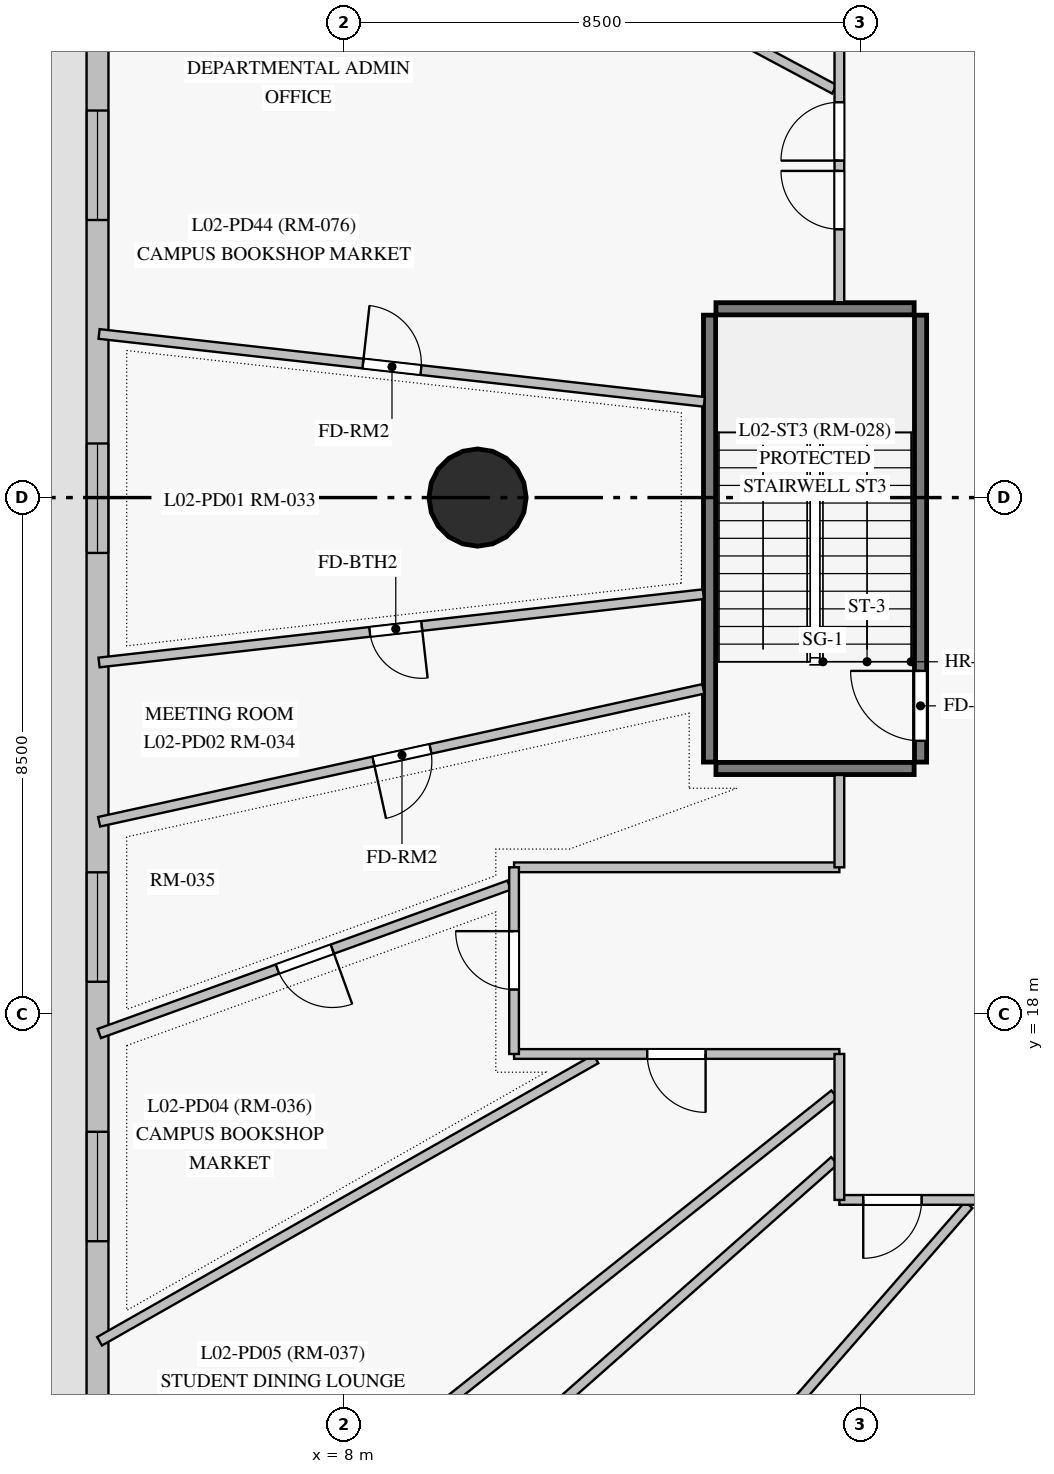
"""IFC4 building model, lengths in metres.
Left out: names, types, materials, properties, quantities, classifications, styles, units other than length and angle.
Written with IfcOpenShell. Run it as: python <this file> out.ifc"""

import sys

from ifc_helpers import new_model, si_unit, direction, frame, frame_2d, origin, origin_with_axes, origin_2d, place, context, subcontext, project, spatial, rectangle, circle, extrude, source, transform, mapped, element, fill, save


model = new_model("IFC4")
c1 = context("Model", 3, precision=1e-05, world=origin(), true_north=direction((0.0, 1.0)))
c2 = subcontext(c1, "Body", "Model", "MODEL_VIEW")
j1 = project(units=[si_unit("LENGTHUNIT", "METRE"), si_unit("PLANEANGLEUNIT", "RADIAN")], contexts=[c1])
p1 = place(None, origin())
s1 = spatial("IfcSite", under=j1, at=p1, CompositionType="ELEMENT")
p2 = place(p1, origin())
s2 = spatial("IfcBuilding", under=s1, at=p2, CompositionType="ELEMENT")
p3 = place(p2, frame((0.0, 0.0, 9.0)))
s3 = spatial("IfcBuildingStorey", under=s2, at=p3, CompositionType="ELEMENT", Elevation=9.0)
m1 = source(origin_with_axes(), c2, "Body", "SweptSolid", [
    extrude(circle(Radius=0.8, at=origin_2d()), origin(), (0.0, 0.0, 1.0), 4.5),
])
p4 = place(p3, frame((10.2, 26.5, 0.0), z_axis=(0.0, 0.0, 1.0), x_axis=(1.0, 0.0, 0.0)))
e1 = element("IfcColumn", 1, at=p4, inside=s3, PredefinedType="COLUMN", context=c2, shape_type="MappedRepresentation", body=[
    mapped(m1, transform((0.0, 0.0, 0.0), scale=1.0)),
])
p5 = place(p3, frame((3.95, 48.35, 0.0), z_axis=(0.0, 0.0, 1.0), x_axis=(0.0, -1.0, 0.0)))
e2 = element("IfcWall", 2, at=p5, inside=s3, PredefinedType="SOLIDWALL", context=c2, shape_type="SweptSolid", body=[
    extrude(rectangle(XDim=43.7, YDim=0.36, at=frame_2d((21.85, 0.0))), origin(), (0.0, 0.0, 1.0), 4.2),
])
p6 = place(p5, frame((1.439, 0.0, 0.85)))
e3 = element("IfcOpeningElement", 3, at=p6, cuts=e2, PredefinedType="OPENING", context=c2, shape_type="SweptSolid", body=[
    extrude(rectangle(XDim=1.8, YDim=2.2, at=frame_2d((0.9, 1.1))), frame((0.0, 0.19, 0.0), z_axis=(0.0, -1.0, 0.0), x_axis=(1.0, 0.0, 0.0)), (0.0, 0.0, 1.0), 0.38),
])
p7 = place(p5, frame((5.669, 0.0, 0.85)))
e4 = element("IfcOpeningElement", 4, at=p7, cuts=e2, PredefinedType="OPENING", context=c2, shape_type="SweptSolid", body=[
    extrude(rectangle(XDim=1.8, YDim=2.2, at=frame_2d((0.9, 1.1))), frame((0.0, 0.19, 0.0), z_axis=(0.0, -1.0, 0.0), x_axis=(1.0, 0.0, 0.0)), (0.0, 0.0, 1.0), 0.38),
])
p8 = place(p5, frame((15.485, 0.0, 0.85)))
e5 = element("IfcOpeningElement", 5, at=p8, cuts=e2, PredefinedType="OPENING", context=c2, shape_type="SweptSolid", body=[
    extrude(rectangle(XDim=1.8, YDim=2.2, at=frame_2d((0.9, 1.1))), frame((0.0, 0.19, 0.0), z_axis=(0.0, -1.0, 0.0), x_axis=(1.0, 0.0, 0.0)), (0.0, 0.0, 1.0), 0.38),
])
p9 = place(p5, frame((20.96, 0.0, 0.85)))
e6 = element("IfcOpeningElement", 6, at=p9, cuts=e2, PredefinedType="OPENING", context=c2, shape_type="SweptSolid", body=[
    extrude(rectangle(XDim=1.8, YDim=2.2, at=frame_2d((0.9, 1.1))), frame((0.0, 0.19, 0.0), z_axis=(0.0, -1.0, 0.0), x_axis=(1.0, 0.0, 0.0)), (0.0, 0.0, 1.0), 0.38),
])
p10 = place(p5, frame((28.012, 0.0, 0.85)))
e7 = element("IfcOpeningElement", 7, at=p10, cuts=e2, PredefinedType="OPENING", context=c2, shape_type="SweptSolid", body=[
    extrude(rectangle(XDim=1.8, YDim=2.2, at=frame_2d((0.9, 1.1))), frame((0.0, 0.19, 0.0), z_axis=(0.0, -1.0, 0.0), x_axis=(1.0, 0.0, 0.0)), (0.0, 0.0, 1.0), 0.38),
])
p11 = place(p5, frame((32.279, 0.0, 0.85)))
e8 = element("IfcOpeningElement", 8, at=p11, cuts=e2, PredefinedType="OPENING", context=c2, shape_type="SweptSolid", body=[
    extrude(rectangle(XDim=1.8, YDim=2.2, at=frame_2d((0.9, 1.1))), frame((0.0, 0.19, 0.0), z_axis=(0.0, -1.0, 0.0), x_axis=(1.0, 0.0, 0.0)), (0.0, 0.0, 1.0), 0.38),
])
p12 = place(p5, frame((37.578, 0.0, 0.85)))
e9 = element("IfcOpeningElement", 9, at=p12, cuts=e2, PredefinedType="OPENING", context=c2, shape_type="SweptSolid", body=[
    extrude(rectangle(XDim=1.8, YDim=2.2, at=frame_2d((0.9, 1.1))), frame((0.0, 0.19, 0.0), z_axis=(0.0, -1.0, 0.0), x_axis=(1.0, 0.0, 0.0)), (0.0, 0.0, 1.0), 0.38),
])
p13 = place(p5, frame((12.221, 0.0, 0.0)))
e10 = element("IfcOpeningElement", 10, at=p13, cuts=e2, PredefinedType="OPENING", context=c2, shape_type="SweptSolid", body=[
    extrude(rectangle(XDim=1.05, YDim=2.12, at=frame_2d((0.525, 1.06))), frame((0.0, 0.19, 0.0), z_axis=(0.0, -1.0, 0.0), x_axis=(1.0, 0.0, 0.0)), (0.0, 0.0, 1.0), 0.38),
])
p14 = place(p3, frame((14.015, 22.15, 0.0), z_axis=(0.0, 0.0, 1.0), x_axis=(0.0, 1.0, 0.0)))
e11 = element("IfcWall", 11, at=p14, inside=s3, PredefinedType="SHEAR", context=c2, shape_type="SweptSolid", body=[
    extrude(rectangle(XDim=7.35, YDim=0.2, at=frame_2d((3.675, 0.0))), origin(), (0.0, 0.0, 1.0), 4.2),
])
p15 = place(p3, frame((17.485, 22.15, 0.0), z_axis=(0.0, 0.0, 1.0), x_axis=(0.0, 1.0, 0.0)))
e12 = element("IfcWall", 12, at=p15, inside=s3, PredefinedType="SHEAR", context=c2, shape_type="SweptSolid", body=[
    extrude(rectangle(XDim=7.35, YDim=0.2, at=frame_2d((3.675, 0.0))), origin(), (0.0, 0.0, 1.0), 4.2),
])
p16 = place(p15, frame((0.35, 0.0, 0.0)))
e13 = element("IfcOpeningElement", 13, at=p16, cuts=e12, PredefinedType="OPENING", context=c2, shape_type="SweptSolid", body=[
    extrude(rectangle(XDim=1.15, YDim=2.15, at=frame_2d((0.575, 1.075))), frame((0.0, 0.11, 0.0), z_axis=(0.0, -1.0, 0.0), x_axis=(1.0, 0.0, 0.0)), (0.0, 0.0, 1.0), 0.22),
])
for number, where, z_axis, x_axis in (
    (14, (14.12, 22.045, 0.0), (0.0, 0.0, 1.0), (1.0, 0.0, 0.0)),
    (15, (14.12, 29.605, 0.0), (0.0, 0.0, 1.0), (1.0, 0.0, 0.0)),
):
    element("IfcWall", number, at=place(p3, frame(where, z_axis=z_axis, x_axis=x_axis)), inside=s3, PredefinedType="SHEAR", context=c2, shape_type="SweptSolid", body=[
        extrude(rectangle(XDim=3.26, YDim=0.2, at=frame_2d((1.63, 0.0))), origin(), (0.0, 0.0, 1.0), 4.2),
    ])
p17 = place(p3, frame((16.068, 15.594, 0.0), z_axis=(0.0, 0.0, 1.0), x_axis=(-0.749344293453, -0.662180587052, 0.0)))
e16 = element("IfcWall", 16, at=p17, inside=s3, PredefinedType="PARTITIONING", context=c2, shape_type="SweptSolid", body=[
    extrude(rectangle(XDim=16.117, YDim=0.16, at=frame_2d((8.058, 0.0))), origin(), (0.0, 0.0, 1.0), 4.2),
])
p18 = place(p17, frame((7.628, 0.0, 0.0)))
e17 = element("IfcOpeningElement", 17, at=p18, cuts=e16, PredefinedType="OPENING", context=c2, shape_type="SweptSolid", body=[
    extrude(rectangle(XDim=0.86, YDim=2.04, at=frame_2d((0.43, 1.02))), frame((0.0, 0.09, 0.0), z_axis=(0.0, -1.0, 0.0), x_axis=(1.0, 0.0, 0.0)), (0.0, 0.0, 1.0), 0.18),
])
p19 = place(p3, frame((16.068, 16.687, 0.0), z_axis=(0.0, 0.0, 1.0), x_axis=(-0.782592647396, -0.622534134198, 0.0)))
e18 = element("IfcWall", 18, at=p19, inside=s3, PredefinedType="PARTITIONING", context=c2, shape_type="SweptSolid", body=[
    extrude(rectangle(XDim=15.435, YDim=0.16, at=frame_2d((7.717, 0.0))), origin(), (0.0, 0.0, 1.0), 4.2),
])
p20 = place(p3, frame((16.068, 33.214, 0.0), z_axis=(0.0, 0.0, 1.0), x_axis=(-0.881886972295, 0.471460887132, 0.0)))
e19 = element("IfcWall", 19, at=p20, inside=s3, PredefinedType="PARTITIONING", context=c2, shape_type="SweptSolid", body=[
    extrude(rectangle(XDim=13.704, YDim=0.16, at=frame_2d((6.852, 0.0))), origin(), (0.0, 0.0, 1.0), 4.2),
])
p21 = place(p20, frame((6.422, 0.0, 0.0)))
e20 = element("IfcOpeningElement", 20, at=p21, cuts=e19, PredefinedType="OPENING", context=c2, shape_type="SweptSolid", body=[
    extrude(rectangle(XDim=0.86, YDim=2.04, at=frame_2d((0.43, 1.02))), frame((0.0, 0.09, 0.0), z_axis=(0.0, -1.0, 0.0), x_axis=(1.0, 0.0, 0.0)), (0.0, 0.0, 1.0), 0.18),
])
p22 = place(p3, frame((21.118, 14.587, 0.0), z_axis=(0.0, 0.0, 1.0), x_axis=(-0.523082178692, -0.852282250393, 0.0)))
e21 = element("IfcWall", 21, at=p22, inside=s3, PredefinedType="PARTITIONING", context=c2, shape_type="SweptSolid", body=[
    extrude(rectangle(XDim=13.261, YDim=0.16, at=frame_2d((6.63, 0.0))), origin(), (0.0, 0.0, 1.0), 4.2),
])
p23 = place(p3, frame((18.277, 14.868, 0.0), z_axis=(0.0, 0.0, 1.0), x_axis=(-0.657226588959, -0.753693048108, 0.0)))
e22 = element("IfcWall", 22, at=p23, inside=s3, PredefinedType="PARTITIONING", context=c2, shape_type="SweptSolid", body=[
    extrude(rectangle(XDim=10.936, YDim=0.16, at=frame_2d((5.468, 0.0))), origin(), (0.0, 0.0, 1.0), 4.2),
])
p24 = place(p3, frame((13.913, 23.354, 0.0), z_axis=(0.0, 0.0, 1.0), x_axis=(-0.976669637868, -0.214747336346, 0.0)))
e23 = element("IfcWall", 23, at=p24, inside=s3, PredefinedType="PARTITIONING", context=c2, shape_type="SweptSolid", body=[
    extrude(rectangle(XDim=10.174, YDim=0.16, at=frame_2d((5.087, 0.0))), origin(), (0.0, 0.0, 1.0), 4.2),
])
p25 = place(p24, frame((4.594, 0.0, 0.0)))
e24 = element("IfcOpeningElement", 24, at=p25, cuts=e23, PredefinedType="OPENING", context=c2, shape_type="SweptSolid", body=[
    extrude(rectangle(XDim=0.96, YDim=2.15, at=frame_2d((0.48, 1.075))), frame((0.0, 0.09, 0.0), z_axis=(0.0, -1.0, 0.0), x_axis=(1.0, 0.0, 0.0)), (0.0, 0.0, 1.0), 0.18),
])
p26 = place(p3, frame((13.913, 24.912, 0.0), z_axis=(0.0, 0.0, 1.0), x_axis=(-0.993672362641, -0.112317566405, 0.0)))
e25 = element("IfcWall", 25, at=p26, inside=s3, PredefinedType="PARTITIONING", context=c2, shape_type="SweptSolid", body=[
    extrude(rectangle(XDim=10.001, YDim=0.16, at=frame_2d((5.0, 0.0))), origin(), (0.0, 0.0, 1.0), 4.2),
])
p27 = place(p26, frame((4.66, 0.0, 0.0)))
e26 = element("IfcOpeningElement", 26, at=p27, cuts=e25, PredefinedType="OPENING", context=c2, shape_type="SweptSolid", body=[
    extrude(rectangle(XDim=0.86, YDim=2.04, at=frame_2d((0.43, 1.02))), frame((0.0, 0.09, 0.0), z_axis=(0.0, -1.0, 0.0), x_axis=(1.0, 0.0, 0.0)), (0.0, 0.0, 1.0), 0.18),
])
p28 = place(p3, frame((3.975, 29.191, 0.0), z_axis=(0.0, 0.0, 1.0), x_axis=(0.993764244895, -0.111501684152, 0.0)))
e27 = element("IfcWall", 27, at=p28, inside=s3, PredefinedType="PARTITIONING", context=c2, shape_type="SweptSolid", body=[
    extrude(rectangle(XDim=10.015, YDim=0.16, at=frame_2d((5.008, 0.0))), origin(), (0.0, 0.0, 1.0), 4.2),
])
p29 = place(p28, frame((4.367, 0.0, 0.0)))
e28 = element("IfcOpeningElement", 28, at=p29, cuts=e27, PredefinedType="OPENING", context=c2, shape_type="SweptSolid", body=[
    extrude(rectangle(XDim=0.96, YDim=2.15, at=frame_2d((0.48, 1.075))), frame((0.0, 0.09, 0.0), z_axis=(0.0, -1.0, 0.0), x_axis=(1.0, 0.0, 0.0)), (0.0, 0.0, 1.0), 0.18),
])
p30 = place(p3, frame((12.146, 17.268, 0.0), z_axis=(0.0, 0.0, 1.0), x_axis=(-0.869250906181, -0.494371178472, 0.0)))
e29 = element("IfcWall", 29, at=p30, inside=s3, PredefinedType="PARTITIONING", context=c2, shape_type="SweptSolid", body=[
    extrude(rectangle(XDim=9.39, YDim=0.16, at=frame_2d((4.695, 0.0))), origin(), (0.0, 0.0, 1.0), 4.2),
])
p31 = place(p3, frame((10.718, 20.126, 0.0), z_axis=(0.0, 0.0, 1.0), x_axis=(-0.940278821487, -0.340405255339, 0.0)))
e30 = element("IfcWall", 30, at=p31, inside=s3, PredefinedType="PARTITIONING", context=c2, shape_type="SweptSolid", body=[
    extrude(rectangle(XDim=7.167, YDim=0.16, at=frame_2d((3.583, 0.0))), origin(), (0.0, 0.0, 1.0), 4.2),
])
p32 = place(p31, frame((3.091, 0.0, 0.0)))
e31 = element("IfcOpeningElement", 31, at=p32, cuts=e30, PredefinedType="OPENING", context=c2, shape_type="SweptSolid", body=[
    extrude(rectangle(XDim=0.96, YDim=2.15, at=frame_2d((0.48, 1.075))), frame((0.0, 0.09, 0.0), z_axis=(0.0, -1.0, 0.0), x_axis=(1.0, 0.0, 0.0)), (0.0, 0.0, 1.0), 0.18),
])
p33 = place(p3, frame((16.15, 29.712, 0.0), z_axis=(0.0, 0.0, 1.0), x_axis=(0.0, 1.0, 0.0)))
e32 = element("IfcWall", 32, at=p33, inside=s3, PredefinedType="PARTITIONING", context=c2, shape_type="SweptSolid", body=[
    extrude(rectangle(XDim=5.861, YDim=0.16, at=frame_2d((2.93, 0.0))), origin(), (0.0, 0.0, 1.0), 4.2),
])
p34 = place(p33, frame((2.33, 0.0, 0.0)))
e33 = element("IfcOpeningElement", 33, at=p34, cuts=e32, PredefinedType="OPENING", context=c2, shape_type="SweptSolid", body=[
    extrude(rectangle(XDim=0.96, YDim=2.15, at=frame_2d((0.48, 1.075))), frame((0.0, 0.09, 0.0), z_axis=(0.0, -1.0, 0.0), x_axis=(1.0, 0.0, 0.0)), (0.0, 0.0, 1.0), 0.18),
])
p35 = place(p33, frame((1.2, 0.0, 0.0)))
e34 = element("IfcOpeningElement", 34, at=p35, cuts=e32, PredefinedType="OPENING", context=c2, shape_type="SweptSolid", body=[
    extrude(rectangle(XDim=0.96, YDim=2.15, at=frame_2d((0.48, 1.075))), frame((0.0, 0.09, 0.0), z_axis=(0.0, -1.0, 0.0), x_axis=(1.0, 0.0, 0.0)), (0.0, 0.0, 1.0), 0.18),
])
p36 = place(p3, frame((16.15, 17.35, 0.0), z_axis=(0.0, 0.0, 1.0), x_axis=(-1.0, 0.0, 0.0)))
e35 = element("IfcWall", 35, at=p36, inside=s3, PredefinedType="PARTITIONING", context=c2, shape_type="SweptSolid", body=[
    extrude(rectangle(XDim=5.35, YDim=0.16, at=frame_2d((2.675, 0.0))), origin(), (0.0, 0.0, 1.0), 4.2),
])
p37 = place(p36, frame((2.2, 0.0, 0.0)))
e36 = element("IfcOpeningElement", 36, at=p37, cuts=e35, PredefinedType="OPENING", context=c2, shape_type="SweptSolid", body=[
    extrude(rectangle(XDim=0.96, YDim=2.15, at=frame_2d((0.48, 1.075))), frame((0.0, 0.09, 0.0), z_axis=(0.0, -1.0, 0.0), x_axis=(1.0, 0.0, 0.0)), (0.0, 0.0, 1.0), 0.18),
])
p38 = place(p3, frame((10.8, 20.42, 0.0), z_axis=(0.0, 0.0, 1.0), x_axis=(1.0, 0.0, 0.0)))
e37 = element("IfcWall", 37, at=p38, inside=s3, PredefinedType="PARTITIONING", context=c2, shape_type="SweptSolid", body=[
    extrude(rectangle(XDim=5.35, YDim=0.16, at=frame_2d((2.675, 0.0))), origin(), (0.0, 0.0, 1.0), 3.25),
])
p39 = place(p3, frame((21.2, 14.95, 0.0), z_axis=(0.0, 0.0, 1.0), x_axis=(-1.0, 0.0, 0.0)))
e38 = element("IfcWall", 38, at=p39, inside=s3, PredefinedType="PARTITIONING", context=c2, shape_type="SweptSolid", body=[
    extrude(rectangle(XDim=5.05, YDim=0.16, at=frame_2d((2.525, 0.0))), origin(), (0.0, 0.0, 1.0), 4.2),
])
p40 = place(p39, frame((3.698, 0.0, 0.0)))
e39 = element("IfcOpeningElement", 39, at=p40, cuts=e38, PredefinedType="OPENING", context=c2, shape_type="SweptSolid", body=[
    extrude(rectangle(XDim=0.96, YDim=2.15, at=frame_2d((0.48, 1.075))), frame((0.0, 0.09, 0.0), z_axis=(0.0, -1.0, 0.0), x_axis=(1.0, 0.0, 0.0)), (0.0, 0.0, 1.0), 0.18),
])
p41 = place(p39, frame((1.76, 0.0, 0.0)))
e40 = element("IfcOpeningElement", 40, at=p41, cuts=e38, PredefinedType="OPENING", context=c2, shape_type="SweptSolid", body=[
    extrude(rectangle(XDim=0.96, YDim=2.15, at=frame_2d((0.48, 1.075))), frame((0.0, 0.09, 0.0), z_axis=(0.0, -1.0, 0.0), x_axis=(1.0, 0.0, 0.0)), (0.0, 0.0, 1.0), 0.18),
])
p42 = place(p3, frame((10.8, 17.35, 0.0), z_axis=(0.0, 0.0, 1.0), x_axis=(0.0, 1.0, 0.0)))
e41 = element("IfcWall", 41, at=p42, inside=s3, PredefinedType="PARTITIONING", context=c2, shape_type="SweptSolid", body=[
    extrude(rectangle(XDim=3.07, YDim=0.16, at=frame_2d((1.535, 0.0))), origin(), (0.0, 0.0, 1.0), 3.25),
])
p43 = place(p42, frame((1.06, 0.0, 0.0)))
e42 = element("IfcOpeningElement", 42, at=p43, cuts=e41, PredefinedType="OPENING", context=c2, shape_type="SweptSolid", body=[
    extrude(rectangle(XDim=0.96, YDim=2.15, at=frame_2d((0.48, 1.075))), frame((0.0, 0.09, 0.0), z_axis=(0.0, -1.0, 0.0), x_axis=(1.0, 0.0, 0.0)), (0.0, 0.0, 1.0), 0.18),
])
p44 = place(p3, frame((16.15, 14.95, 0.0), z_axis=(0.0, 0.0, 1.0), x_axis=(0.0, 1.0, 0.0)))
e43 = element("IfcWall", 43, at=p44, inside=s3, PredefinedType="PARTITIONING", context=c2, shape_type="SweptSolid", body=[
    extrude(rectangle(XDim=2.4, YDim=0.16, at=frame_2d((1.2, 0.0))), origin(), (0.0, 0.0, 1.0), 3.25),
])
p45 = place(p3, frame((16.15, 20.42, 0.0), z_axis=(0.0, 0.0, 1.0), x_axis=(0.0, 1.0, 0.0)))
e44 = element("IfcWall", 44, at=p45, inside=s3, PredefinedType="PARTITIONING", context=c2, shape_type="SweptSolid", body=[
    extrude(rectangle(XDim=1.518, YDim=0.16, at=frame_2d((0.759, 0.0))), origin(), (0.0, 0.0, 1.0), 4.2),
])
m2 = source(origin_with_axes(), c2, "Body", "SweptSolid", [
    extrude(rectangle(XDim=1.8, YDim=2.2, at=frame_2d((0.9, 1.1))), frame((0.0, 0.03, 0.0), z_axis=(0.0, -1.0, 0.0), x_axis=(1.0, 0.0, 0.0)), (0.0, 0.0, 1.0), 0.06),
])
p46 = place(p8, origin())
e45 = element("IfcWindow", 45, at=p46, inside=s3, PartitioningType="SINGLE_PANEL", PredefinedType="WINDOW", context=c2, shape_type="MappedRepresentation", body=[
    mapped(m2, transform((0.0, 0.0, 0.0), scale=1.0)),
])
fill(e5, e45)
p47 = place(p9, origin())
e46 = element("IfcWindow", 46, at=p47, inside=s3, PartitioningType="SINGLE_PANEL", PredefinedType="WINDOW", context=c2, shape_type="MappedRepresentation", body=[
    mapped(m2, transform((0.0, 0.0, 0.0), scale=1.0)),
])
fill(e6, e46)
p48 = place(p10, origin())
e47 = element("IfcWindow", 47, at=p48, inside=s3, PartitioningType="SINGLE_PANEL", PredefinedType="WINDOW", context=c2, shape_type="MappedRepresentation", body=[
    mapped(m2, transform((0.0, 0.0, 0.0), scale=1.0)),
])
fill(e7, e47)
p49 = place(p11, origin())
e48 = element("IfcWindow", 48, at=p49, inside=s3, PartitioningType="SINGLE_PANEL", PredefinedType="WINDOW", context=c2, shape_type="MappedRepresentation", body=[
    mapped(m2, transform((0.0, 0.0, 0.0), scale=1.0)),
])
fill(e8, e48)
m3 = source(origin_with_axes(), c2, "Body", "SweptSolid", [
    extrude(rectangle(XDim=1.15, YDim=2.15, at=frame_2d((0.575, 1.075))), frame((0.0, 0.025, 0.0), z_axis=(0.0, -1.0, 0.0), x_axis=(1.0, 0.0, 0.0)), (0.0, 0.0, 1.0), 0.05),
])
p50 = place(p16, origin())
e49 = element("IfcDoor", 49, at=p50, inside=s3, OperationType="SINGLE_SWING_RIGHT", PredefinedType="DOOR", context=c2, shape_type="MappedRepresentation", body=[
    mapped(m3, transform((0.0, 0.0, 0.0), scale=1.0)),
])
fill(e13, e49)
m4 = source(origin_with_axes(), c2, "Body", "SweptSolid", [
    extrude(rectangle(XDim=0.96, YDim=2.15, at=frame_2d((0.48, 1.075))), frame((0.0, 0.025, 0.0), z_axis=(0.0, -1.0, 0.0), x_axis=(1.0, 0.0, 0.0)), (0.0, 0.0, 1.0), 0.05),
])
p51 = place(p29, origin())
e50 = element("IfcDoor", 50, at=p51, inside=s3, OperationType="SINGLE_SWING_LEFT", PredefinedType="DOOR", context=c2, shape_type="MappedRepresentation", body=[
    mapped(m4, transform((0.0, 0.0, 0.0), scale=1.0)),
])
fill(e28, e50)
p52 = place(p25, origin())
e51 = element("IfcDoor", 51, at=p52, inside=s3, OperationType="SINGLE_SWING_RIGHT", PredefinedType="DOOR", context=c2, shape_type="MappedRepresentation", body=[
    mapped(m4, transform((0.0, 0.0, 0.0), scale=1.0)),
])
fill(e24, e51)
p53 = place(p32, origin())
e52 = element("IfcDoor", 52, at=p53, inside=s3, OperationType="SINGLE_SWING_LEFT", PredefinedType="DOOR", context=c2, shape_type="MappedRepresentation", body=[
    mapped(m4, transform((0.0, 0.0, 0.0), scale=1.0)),
])
fill(e31, e52)
p54 = place(p43, origin())
e53 = element("IfcDoor", 53, at=p54, inside=s3, OperationType="SINGLE_SWING_RIGHT", PredefinedType="DOOR", context=c2, shape_type="MappedRepresentation", body=[
    mapped(m4, transform((0.0, 0.0, 0.0), scale=1.0)),
])
fill(e42, e53)
p55 = place(p37, origin())
e54 = element("IfcDoor", 54, at=p55, inside=s3, OperationType="SINGLE_SWING_LEFT", PredefinedType="DOOR", context=c2, shape_type="MappedRepresentation", body=[
    mapped(m4, transform((0.0, 0.0, 0.0), scale=1.0)),
])
fill(e36, e54)
p56 = place(p40, origin())
e55 = element("IfcDoor", 55, at=p56, inside=s3, OperationType="SINGLE_SWING_RIGHT", PredefinedType="DOOR", context=c2, shape_type="MappedRepresentation", body=[
    mapped(m4, transform((0.0, 0.0, 0.0), scale=1.0)),
])
fill(e39, e55)
p57 = place(p34, origin())
e56 = element("IfcDoor", 56, at=p57, inside=s3, OperationType="SINGLE_SWING_LEFT", PredefinedType="DOOR", context=c2, shape_type="MappedRepresentation", body=[
    mapped(m4, transform((0.0, 0.0, 0.0), scale=1.0)),
])
fill(e33, e56)
p58 = place(p35, origin())
e57 = element("IfcDoor", 57, at=p58, inside=s3, OperationType="SINGLE_SWING_RIGHT", PredefinedType="DOOR", context=c2, shape_type="MappedRepresentation", body=[
    mapped(m4, transform((0.0, 0.0, 0.0), scale=1.0)),
])
fill(e34, e57)
m5 = source(origin_with_axes(), c2, "Body", "SweptSolid", [
    extrude(rectangle(XDim=0.86, YDim=2.04, at=frame_2d((0.43, 1.02))), frame((0.0, 0.025, 0.0), z_axis=(0.0, -1.0, 0.0), x_axis=(1.0, 0.0, 0.0)), (0.0, 0.0, 1.0), 0.05),
])
p59 = place(p27, origin())
e58 = element("IfcDoor", 58, at=p59, inside=s3, OperationType="SINGLE_SWING_LEFT", PredefinedType="DOOR", context=c2, shape_type="MappedRepresentation", body=[
    mapped(m5, transform((0.0, 0.0, 0.0), scale=1.0)),
])
fill(e26, e58)
save(model, sys.argv[1])
